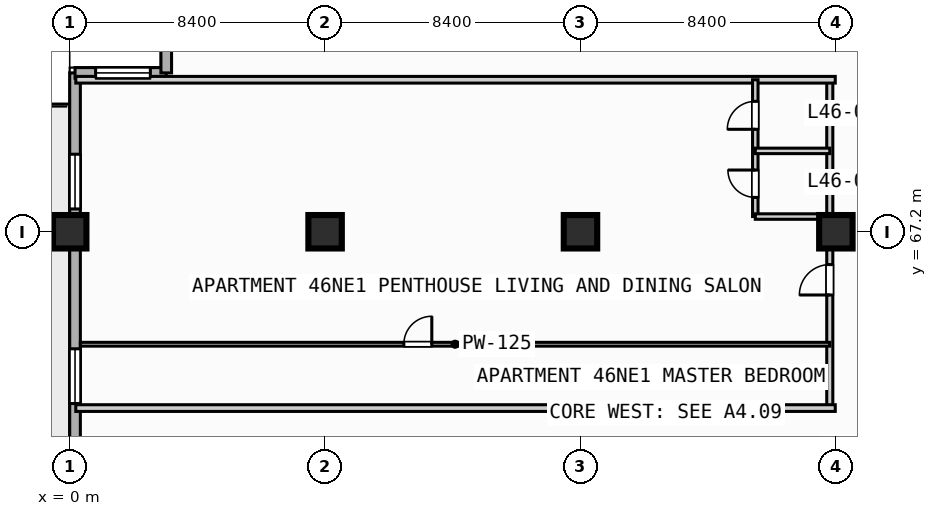
"""IFC4 building model, lengths in metres.
Left out: names, types, materials, properties, quantities, classifications, styles, units other than length and angle.
Written with IfcOpenShell. Run it as: python <this file> out.ifc"""

import sys

from ifc_helpers import new_model, si_unit, direction, frame, frame_2d, origin, origin_2d, place, context, subcontext, project, spatial, rectangle, extrude, element, fill, save


model = new_model("IFC4")
c1 = context("Model", 3, precision=1e-05, world=origin(), true_north=direction((0.0, 1.0)))
c2 = subcontext(c1, "Body", "Model", "MODEL_VIEW")
j1 = project(units=[si_unit("LENGTHUNIT", "METRE"), si_unit("PLANEANGLEUNIT", "RADIAN")], contexts=[c1])
p1 = place(None, origin())
s1 = spatial("IfcSite", under=j1, at=p1, CompositionType="ELEMENT")
p2 = place(p1, origin())
s2 = spatial("IfcBuilding", under=s1, at=p2, CompositionType="ELEMENT")
p3 = place(p2, frame((0.0, 0.0, 190.2)))
s3 = spatial("IfcBuildingStorey", under=s2, at=p3, CompositionType="ELEMENT", Elevation=190.2)
for number, where, z_axis, x_axis in (
    (1, (0.0, 67.2, 0.0), (0.0, 0.0, 1.0), (1.0, 0.0, 0.0)),
    (2, (8.4, 67.2, 0.0), (0.0, 0.0, 1.0), (1.0, 0.0, 0.0)),
    (3, (16.8, 67.2, 0.0), (0.0, 0.0, 1.0), (1.0, 0.0, 0.0)),
    (4, (25.2, 67.2, 0.0), (0.0, 0.0, 1.0), (1.0, 0.0, 0.0)),
):
    element("IfcColumn", number, at=place(p3, frame(where, z_axis=z_axis, x_axis=x_axis)), inside=s3, PredefinedType="COLUMN", context=c2, shape_type="SweptSolid", body=[
        extrude(rectangle(XDim=1.1, YDim=1.1, at=origin_2d()), origin(), (0.0, 0.0, 1.0), 3.7),
    ])
p4 = place(p3, frame((0.175, 3.175, 0.0), z_axis=(0.0, 0.0, 1.0), x_axis=(0.0, 1.0, 0.0)))
e5 = element("IfcWall", 5, at=p4, inside=s3, PredefinedType="STANDARD", context=c2, shape_type="SweptSolid", body=[
    extrude(rectangle(XDim=69.25, YDim=0.35, at=frame_2d((34.625, 0.0))), origin(), (0.0, 0.0, 1.0), 3.47),
])
p5 = place(p4, frame((42.325, 0.0, 0.0)))
e6 = element("IfcOpeningElement", 6, at=p5, cuts=e5, PredefinedType="OPENING", context=c2, shape_type="SweptSolid", body=[
    extrude(rectangle(XDim=1.4, YDim=2.2, at=frame_2d((0.7, 1.1))), frame((0.0, 0.185, 0.0), z_axis=(0.0, -1.0, 0.0), x_axis=(1.0, 0.0, 0.0)), (0.0, 0.0, 1.0), 0.37),
])
p6 = place(p4, frame((25.025, 0.0, 0.85)))
e7 = element("IfcOpeningElement", 7, at=p6, cuts=e5, PredefinedType="OPENING", context=c2, shape_type="SweptSolid", body=[
    extrude(rectangle(XDim=2.4, YDim=1.95, at=frame_2d((1.2, 0.975))), frame((0.0, 0.185, 0.0), z_axis=(0.0, -1.0, 0.0), x_axis=(1.0, 0.0, 0.0)), (0.0, 0.0, 1.0), 0.37),
])
p7 = place(p4, frame((33.725, 0.0, 0.85)))
e8 = element("IfcOpeningElement", 8, at=p7, cuts=e5, PredefinedType="OPENING", context=c2, shape_type="SweptSolid", body=[
    extrude(rectangle(XDim=1.8, YDim=1.8, at=frame_2d((0.9, 0.9))), frame((0.0, 0.185, 0.0), z_axis=(0.0, -1.0, 0.0), x_axis=(1.0, 0.0, 0.0)), (0.0, 0.0, 1.0), 0.37),
])
p8 = place(p4, frame((58.375, 0.0, 0.85)))
e9 = element("IfcOpeningElement", 9, at=p8, cuts=e5, PredefinedType="OPENING", context=c2, shape_type="SweptSolid", body=[
    extrude(rectangle(XDim=1.8, YDim=1.8, at=frame_2d((0.9, 0.9))), frame((0.0, 0.185, 0.0), z_axis=(0.0, -1.0, 0.0), x_axis=(1.0, 0.0, 0.0)), (0.0, 0.0, 1.0), 0.37),
])
p9 = place(p4, frame((64.775, 0.0, 0.85)))
e10 = element("IfcOpeningElement", 10, at=p9, cuts=e5, PredefinedType="OPENING", context=c2, shape_type="SweptSolid", body=[
    extrude(rectangle(XDim=1.8, YDim=1.8, at=frame_2d((0.9, 0.9))), frame((0.0, 0.185, 0.0), z_axis=(0.0, -1.0, 0.0), x_axis=(1.0, 0.0, 0.0)), (0.0, 0.0, 1.0), 0.37),
])
p10 = place(p3, frame((0.175, 72.425, 0.0), z_axis=(0.0, 0.0, 1.0), x_axis=(1.0, 0.0, 0.0)))
e11 = element("IfcWall", 11, at=p10, inside=s3, PredefinedType="STANDARD", context=c2, shape_type="SweptSolid", body=[
    extrude(rectangle(XDim=3.0, YDim=0.35, at=frame_2d((1.5, 0.0))), origin(), (0.0, 0.0, 1.0), 3.47),
])
p11 = place(p10, frame((0.677, 0.0, 0.85)))
e12 = element("IfcOpeningElement", 12, at=p11, cuts=e11, PredefinedType="OPENING", context=c2, shape_type="SweptSolid", body=[
    extrude(rectangle(XDim=1.8, YDim=1.8, at=frame_2d((0.9, 0.9))), frame((0.0, 0.185, 0.0), z_axis=(0.0, -1.0, 0.0), x_axis=(1.0, 0.0, 0.0)), (0.0, 0.0, 1.0), 0.37),
])
p12 = place(p3, frame((3.175, 72.425, 0.0), z_axis=(0.0, 0.0, 1.0), x_axis=(0.0, 1.0, 0.0)))
e13 = element("IfcWall", 13, at=p12, inside=s3, PredefinedType="STANDARD", context=c2, shape_type="SweptSolid", body=[
    extrude(rectangle(XDim=3.0, YDim=0.35, at=frame_2d((1.5, 0.0))), origin(), (0.0, 0.0, 1.0), 3.47),
])
p13 = place(p3, frame((25.0, 61.4, 0.0), z_axis=(0.0, 0.0, 1.0), x_axis=(0.0, 1.0, 0.0)))
e14 = element("IfcWall", 14, at=p13, inside=s3, PredefinedType="PARTITIONING", context=c2, shape_type="SweptSolid", body=[
    extrude(rectangle(XDim=10.8, YDim=0.2, at=frame_2d((5.4, 0.0))), origin(), (0.0, 0.0, 1.0), 2.82),
])
p14 = place(p13, frame((3.72, 0.0, 0.0)))
e15 = element("IfcOpeningElement", 15, at=p14, cuts=e14, PredefinedType="OPENING", context=c2, shape_type="SweptSolid", body=[
    extrude(rectangle(XDim=1.0, YDim=2.15, at=frame_2d((0.5, 1.075))), frame((0.0, 0.11, 0.0), z_axis=(0.0, -1.0, 0.0), x_axis=(1.0, 0.0, 0.0)), (0.0, 0.0, 1.0), 0.22),
])
for number, where, z_axis, x_axis in (
    (16, (0.2, 61.4, 0.0), (0.0, 0.0, 1.0), (1.0, 0.0, 0.0)),
    (17, (0.2, 72.2, 0.0), (0.0, 0.0, 1.0), (1.0, 0.0, 0.0)),
):
    element("IfcWall", number, at=place(p3, frame(where, z_axis=z_axis, x_axis=x_axis)), inside=s3, PredefinedType="PARTITIONING", context=c2, shape_type="SweptSolid", body=[
        extrude(rectangle(XDim=24.98, YDim=0.22, at=frame_2d((12.49, 0.0))), origin(), (0.0, 0.0, 1.0), 3.47),
    ])
p15 = place(p3, frame((22.55, 67.7, 0.0), z_axis=(0.0, 0.0, 1.0), x_axis=(0.0, 1.0, 0.0)))
e18 = element("IfcWall", 18, at=p15, inside=s3, PredefinedType="PLUMBINGWALL", context=c2, shape_type="SweptSolid", body=[
    extrude(rectangle(XDim=4.5, YDim=0.18, at=frame_2d((2.25, 0.0))), origin(), (0.0, 0.0, 1.0), 3.47),
])
p16 = place(p15, frame((0.63, 0.0, 0.0)))
e19 = element("IfcOpeningElement", 19, at=p16, cuts=e18, PredefinedType="OPENING", context=c2, shape_type="SweptSolid", body=[
    extrude(rectangle(XDim=0.9, YDim=2.1, at=frame_2d((0.45, 1.05))), frame((0.0, 0.1, 0.0), z_axis=(0.0, -1.0, 0.0), x_axis=(1.0, 0.0, 0.0)), (0.0, 0.0, 1.0), 0.2),
])
p17 = place(p15, frame((2.87, 0.0, 0.0)))
e20 = element("IfcOpeningElement", 20, at=p17, cuts=e18, PredefinedType="OPENING", context=c2, shape_type="SweptSolid", body=[
    extrude(rectangle(XDim=0.92, YDim=2.1, at=frame_2d((0.46, 1.05))), frame((0.0, 0.1, 0.0), z_axis=(0.0, -1.0, 0.0), x_axis=(1.0, 0.0, 0.0)), (0.0, 0.0, 1.0), 0.2),
])
for number, where, z_axis, x_axis in (
    (21, (22.55, 67.7, 0.0), (0.0, 0.0, 1.0), (1.0, 0.0, 0.0)),
    (22, (22.55, 69.86, 0.0), (0.0, 0.0, 1.0), (1.0, 0.0, 0.0)),
):
    element("IfcWall", number, at=place(p3, frame(where, z_axis=z_axis, x_axis=x_axis)), inside=s3, PredefinedType="PLUMBINGWALL", context=c2, shape_type="SweptSolid", body=[
        extrude(rectangle(XDim=2.45, YDim=0.18, at=frame_2d((1.225, 0.0))), origin(), (0.0, 0.0, 1.0), 3.47),
    ])
p18 = place(p3, frame((0.35, 63.5, 0.0), z_axis=(0.0, 0.0, 1.0), x_axis=(1.0, 0.0, 0.0)))
e23 = element("IfcWall", 23, at=p18, inside=s3, PredefinedType="PARTITIONING", context=c2, shape_type="SweptSolid", body=[
    extrude(rectangle(XDim=24.65, YDim=0.125, at=frame_2d((12.325, 0.0))), origin(), (0.0, 0.0, 1.0), 3.47),
])
p19 = place(p18, frame((10.64, 0.0, 0.0)))
e24 = element("IfcOpeningElement", 24, at=p19, cuts=e23, PredefinedType="OPENING", context=c2, shape_type="SweptSolid", body=[
    extrude(rectangle(XDim=0.92, YDim=2.1, at=frame_2d((0.46, 1.05))), frame((0.0, 0.073, 0.0), z_axis=(0.0, -1.0, 0.0), x_axis=(1.0, 0.0, 0.0)), (0.0, 0.0, 1.0), 0.145),
])
p20 = place(p8, origin())
e25 = element("IfcWindow", 25, at=p20, inside=s3, PartitioningType="SINGLE_PANEL", PredefinedType="WINDOW", context=c2, shape_type="SweptSolid", body=[
    extrude(rectangle(XDim=1.8, YDim=1.8, at=frame_2d((0.9, 0.9))), frame((0.0, 0.03, 0.0), z_axis=(0.0, -1.0, 0.0), x_axis=(1.0, 0.0, 0.0)), (0.0, 0.0, 1.0), 0.06),
])
fill(e9, e25)
p21 = place(p9, origin())
e26 = element("IfcWindow", 26, at=p21, inside=s3, PartitioningType="SINGLE_PANEL", PredefinedType="WINDOW", context=c2, shape_type="SweptSolid", body=[
    extrude(rectangle(XDim=1.8, YDim=1.8, at=frame_2d((0.9, 0.9))), frame((0.0, 0.03, 0.0), z_axis=(0.0, -1.0, 0.0), x_axis=(1.0, 0.0, 0.0)), (0.0, 0.0, 1.0), 0.06),
])
fill(e10, e26)
p22 = place(p11, origin())
e27 = element("IfcWindow", 27, at=p22, inside=s3, PartitioningType="SINGLE_PANEL", PredefinedType="WINDOW", context=c2, shape_type="SweptSolid", body=[
    extrude(rectangle(XDim=1.8, YDim=1.8, at=frame_2d((0.9, 0.9))), frame((0.0, 0.03, 0.0), z_axis=(0.0, -1.0, 0.0), x_axis=(1.0, 0.0, 0.0)), (0.0, 0.0, 1.0), 0.06),
])
fill(e12, e27)
p23 = place(p14, origin())
e28 = element("IfcDoor", 28, at=p23, inside=s3, OperationType="SINGLE_SWING_LEFT", PredefinedType="DOOR", context=c2, shape_type="SweptSolid", body=[
    extrude(rectangle(XDim=1.0, YDim=2.15, at=frame_2d((0.5, 1.075))), frame((0.0, 0.025, 0.0), z_axis=(0.0, -1.0, 0.0), x_axis=(1.0, 0.0, 0.0)), (0.0, 0.0, 1.0), 0.05),
])
fill(e15, e28)
p24 = place(p16, origin())
e29 = element("IfcDoor", 29, at=p24, inside=s3, OperationType="SINGLE_SWING_RIGHT", PredefinedType="DOOR", context=c2, shape_type="SweptSolid", body=[
    extrude(rectangle(XDim=0.9, YDim=2.1, at=frame_2d((0.45, 1.05))), frame((0.0, 0.025, 0.0), z_axis=(0.0, -1.0, 0.0), x_axis=(1.0, 0.0, 0.0)), (0.0, 0.0, 1.0), 0.05),
])
fill(e19, e29)
p25 = place(p17, origin())
e30 = element("IfcDoor", 30, at=p25, inside=s3, OperationType="SINGLE_SWING_LEFT", PredefinedType="DOOR", context=c2, shape_type="SweptSolid", body=[
    extrude(rectangle(XDim=0.92, YDim=2.1, at=frame_2d((0.46, 1.05))), frame((0.0, 0.025, 0.0), z_axis=(0.0, -1.0, 0.0), x_axis=(1.0, 0.0, 0.0)), (0.0, 0.0, 1.0), 0.05),
])
fill(e20, e30)
p26 = place(p19, origin())
e31 = element("IfcDoor", 31, at=p26, inside=s3, OperationType="SINGLE_SWING_RIGHT", PredefinedType="DOOR", context=c2, shape_type="SweptSolid", body=[
    extrude(rectangle(XDim=0.92, YDim=2.1, at=frame_2d((0.46, 1.05))), frame((0.0, 0.025, 0.0), z_axis=(0.0, -1.0, 0.0), x_axis=(1.0, 0.0, 0.0)), (0.0, 0.0, 1.0), 0.05),
])
fill(e24, e31)
save(model, sys.argv[1])
